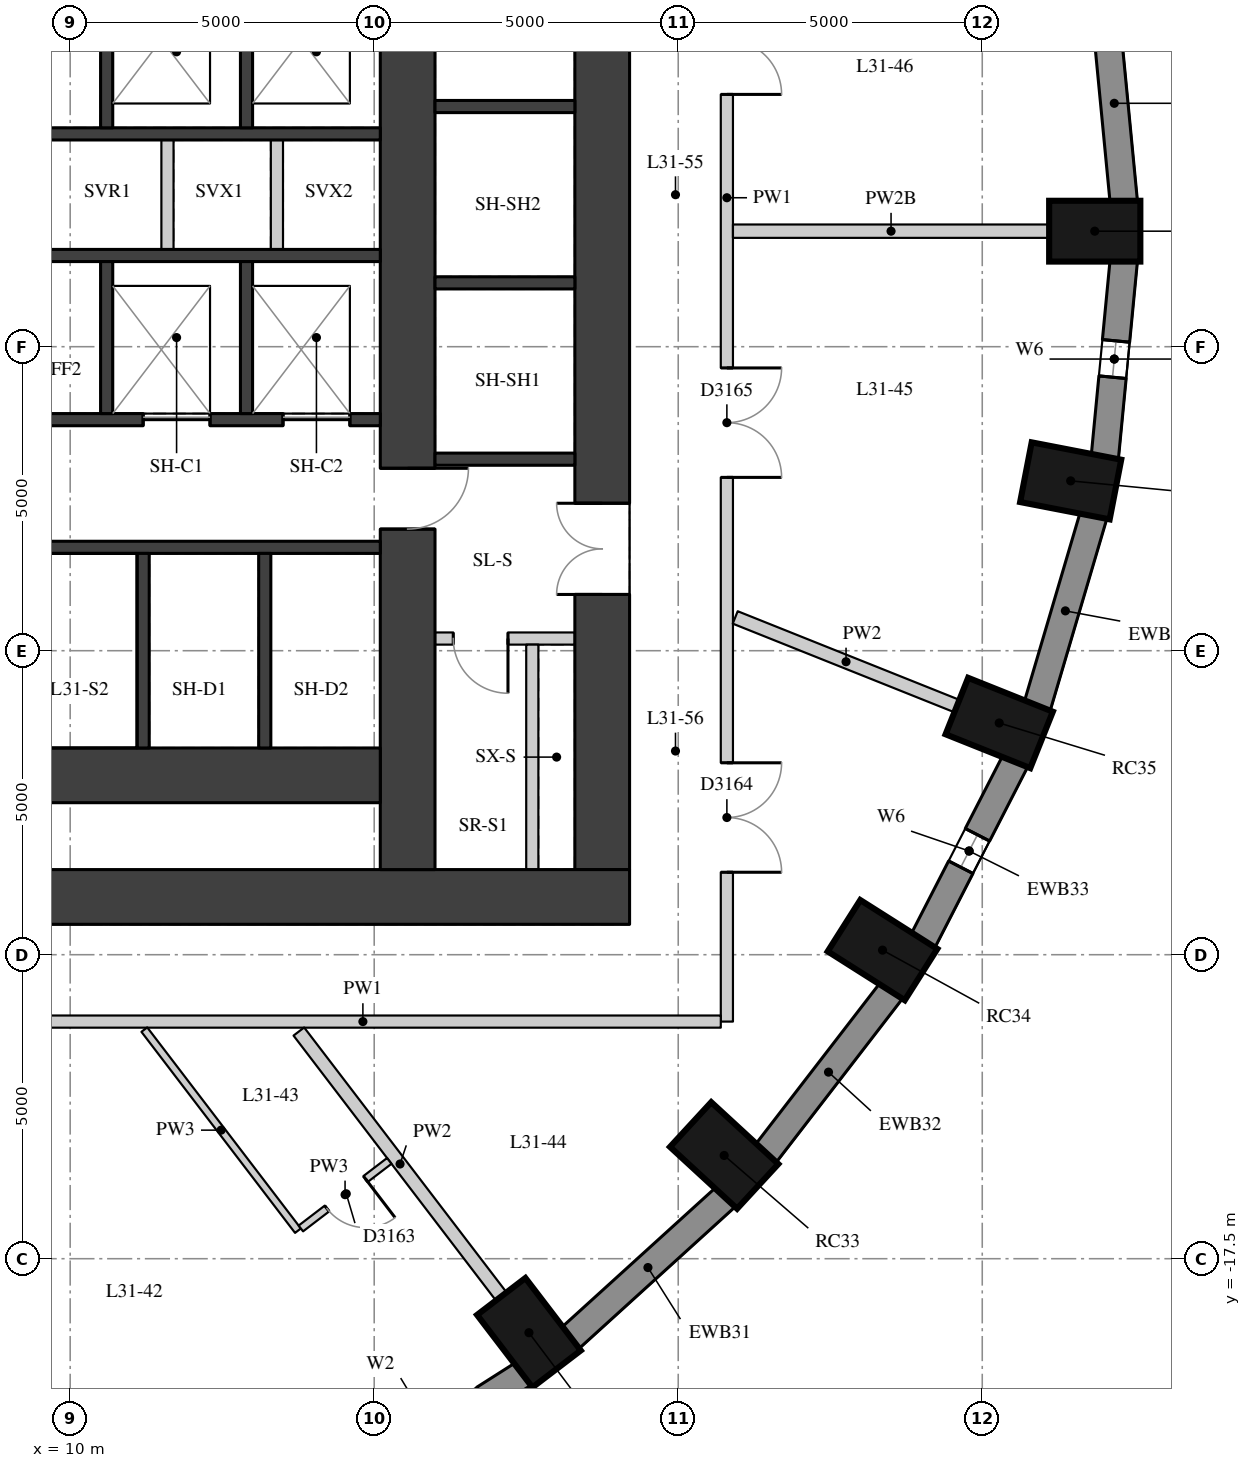
"""IFC4 building model, lengths in metres.
Left out: names, types, materials, properties, quantities, classifications, styles, units other than length and angle.
Written with IfcOpenShell. Run it as: python <this file> out.ifc"""

import sys

from ifc_helpers import new_model, si_unit, direction, frame, frame_2d, origin, origin_2d, place, context, subcontext, project, spatial, rectangle, extrude, element, fill, save


model = new_model("IFC4")
c1 = context("Model", 3, precision=1e-05, world=origin(), true_north=direction((0.0, 1.0)))
c2 = subcontext(c1, "Body", "Model", "MODEL_VIEW")
j1 = project(units=[si_unit("LENGTHUNIT", "METRE"), si_unit("PLANEANGLEUNIT", "RADIAN")], contexts=[c1])
p1 = place(None, origin())
s1 = spatial("IfcSite", under=j1, at=p1, CompositionType="ELEMENT")
p2 = place(p1, origin())
s2 = spatial("IfcBuilding", under=s1, at=p2, CompositionType="ELEMENT")
p3 = place(p2, frame((0.0, 0.0, 112.0)))
s3 = spatial("IfcBuildingStorey", under=s2, at=p3, CompositionType="ELEMENT", Elevation=112.0)
for number, where, z_axis, x_axis in (
    (1, (26.85, -0.6, 0.0), (0.0, 0.0, 1.0), (1.0, 0.0, 0.0)),
    (2, (17.545, -18.717, 0.0), (0.0, 0.0, 1.0), (0.607, -0.795, 0.0)),
    (3, (20.755, -15.802, 0.0), (0.0, 0.0, 1.0), (0.735, -0.678, 0.0)),
    (4, (23.36, -12.425, 0.0), (0.0, 0.0, 1.0), (0.845, -0.536, 0.0)),
    (5, (25.279, -8.689, 0.0), (0.0, 0.0, 1.0), (0.929, -0.371, 0.0)),
    (6, (26.454, -4.707, 0.0), (0.0, 0.0, 1.0), (0.982, -0.19, 0.0)),
):
    element("IfcColumn", number, at=place(p3, frame(where, z_axis=z_axis, x_axis=x_axis)), inside=s3, PredefinedType="COLUMN", context=c2, shape_type="SweptSolid", body=[
        extrude(rectangle(XDim=1.5, YDim=1.0, at=origin_2d()), origin(), (0.0, 0.0, 1.0), 3.3),
    ])
p4 = place(p3, frame((27.328, -0.12, 0.0), z_axis=(0.0, 0.0, 1.0), x_axis=(-0.09589355735, 0.995391594127, 0.0)))
e7 = element("IfcWall", 7, at=p4, inside=s3, PredefinedType="SOLIDWALL", context=c2, shape_type="SweptSolid", body=[
    extrude(rectangle(XDim=3.261, YDim=0.45, at=frame_2d((1.631, 0.0))), origin(), (0.0, 0.0, 1.0), 3.02),
])
p5 = place(p3, frame((14.475, -21.287, 0.0), z_axis=(0.0, 0.0, 1.0), x_axis=(0.843911841423, 0.536481876587, 0.0)))
e8 = element("IfcWall", 8, at=p5, inside=s3, PredefinedType="SOLIDWALL", context=c2, shape_type="SweptSolid", body=[
    extrude(rectangle(XDim=3.532, YDim=0.45, at=frame_2d((1.766, 0.0))), origin(), (0.0, 0.0, 1.0), 3.02),
])
p6 = place(p5, frame((0.766, 0.0, 0.4)))
e9 = element("IfcOpeningElement", 9, at=p6, cuts=e8, PredefinedType="OPENING", context=c2, shape_type="SweptSolid", body=[
    extrude(rectangle(XDim=2.0, YDim=1.75, at=frame_2d((1.0, 0.875))), frame((0.0, 0.235, 0.0), z_axis=(0.0, -1.0, 0.0), x_axis=(1.0, 0.0, 0.0)), (0.0, 0.0, 1.0), 0.47),
])
p7 = place(p3, frame((18.219, -18.81, 0.0), z_axis=(0.0, 0.0, 1.0), x_axis=(0.740364106106, 0.672206062446, 0.0)))
e10 = element("IfcWall", 10, at=p7, inside=s3, PredefinedType="SOLIDWALL", context=c2, shape_type="SweptSolid", body=[
    extrude(rectangle(XDim=3.464, YDim=0.45, at=frame_2d((1.732, 0.0))), origin(), (0.0, 0.0, 1.0), 3.02),
])
p8 = place(p3, frame((21.435, -15.775, 0.0), z_axis=(0.0, 0.0, 1.0), x_axis=(0.610693945156, 0.791866721961, 0.0)))
e11 = element("IfcWall", 11, at=p8, inside=s3, PredefinedType="SOLIDWALL", context=c2, shape_type="SweptSolid", body=[
    extrude(rectangle(XDim=3.395, YDim=0.45, at=frame_2d((1.697, 0.0))), origin(), (0.0, 0.0, 1.0), 3.02),
])
p9 = place(p3, frame((24.023, -12.277, 0.0), z_axis=(0.0, 0.0, 1.0), x_axis=(0.456828186229, 0.889554949549, 0.0)))
e12 = element("IfcWall", 12, at=p9, inside=s3, PredefinedType="SOLIDWALL", context=c2, shape_type="SweptSolid", body=[
    extrude(rectangle(XDim=3.333, YDim=0.45, at=frame_2d((1.667, 0.0))), origin(), (0.0, 0.0, 1.0), 3.02),
])
p10 = place(p9, frame((1.366, 0.0, 0.4)))
e13 = element("IfcOpeningElement", 13, at=p10, cuts=e12, PredefinedType="OPENING", context=c2, shape_type="SweptSolid", body=[
    extrude(rectangle(XDim=0.6, YDim=1.75, at=frame_2d((0.3, 0.875))), frame((0.0, 0.235, 0.0), z_axis=(0.0, -1.0, 0.0), x_axis=(1.0, 0.0, 0.0)), (0.0, 0.0, 1.0), 0.47),
])
p11 = place(p3, frame((25.902, -8.421, 0.0), z_axis=(0.0, 0.0, 1.0), x_axis=(0.282982737009, 0.95912500257, 0.0)))
e14 = element("IfcWall", 14, at=p11, inside=s3, PredefinedType="SOLIDWALL", context=c2, shape_type="SweptSolid", body=[
    extrude(rectangle(XDim=3.286, YDim=0.45, at=frame_2d((1.643, 0.0))), origin(), (0.0, 0.0, 1.0), 3.02),
])
p12 = place(p3, frame((27.015, -4.326, 0.0), z_axis=(0.0, 0.0, 1.0), x_axis=(0.09589355735, 0.995391594127, 0.0)))
e15 = element("IfcWall", 15, at=p12, inside=s3, PredefinedType="SOLIDWALL", context=c2, shape_type="SweptSolid", body=[
    extrude(rectangle(XDim=3.261, YDim=0.45, at=frame_2d((1.631, 0.0))), origin(), (0.0, 0.0, 1.0), 3.02),
])
p13 = place(p12, frame((1.331, 0.0, 0.4)))
e16 = element("IfcOpeningElement", 16, at=p13, cuts=e15, PredefinedType="OPENING", context=c2, shape_type="SweptSolid", body=[
    extrude(rectangle(XDim=0.6, YDim=1.75, at=frame_2d((0.3, 0.875))), frame((0.0, 0.235, 0.0), z_axis=(0.0, -1.0, 0.0), x_axis=(1.0, 0.0, 0.0)), (0.0, 0.0, 1.0), 0.47),
])
p14 = place(p3, frame((18.75, -11.1, 0.0), z_axis=(0.0, 0.0, 1.0), x_axis=(0.0, 1.0, 0.0)))
e17 = element("IfcWall", 17, at=p14, inside=s3, PredefinedType="SHEAR", context=c2, shape_type="SweptSolid", body=[
    extrude(rectangle(XDim=22.2, YDim=0.9, at=frame_2d((11.1, 0.0))), origin(), (0.0, 0.0, 1.0), 3.02),
])
p15 = place(p14, frame((15.925, 0.0, 0.0)))
e18 = element("IfcOpeningElement", 18, at=p15, cuts=e17, PredefinedType="OPENING", context=c2, shape_type="SweptSolid", body=[
    extrude(rectangle(XDim=1.5, YDim=2.1, at=frame_2d((0.75, 1.05))), frame((0.0, 0.46, 0.0), z_axis=(0.0, -1.0, 0.0), x_axis=(1.0, 0.0, 0.0)), (0.0, 0.0, 1.0), 0.92),
])
p16 = place(p14, frame((4.525, 0.0, 0.0)))
e19 = element("IfcOpeningElement", 19, at=p16, cuts=e17, PredefinedType="OPENING", context=c2, shape_type="SweptSolid", body=[
    extrude(rectangle(XDim=1.5, YDim=2.1, at=frame_2d((0.75, 1.05))), frame((0.0, 0.46, 0.0), z_axis=(0.0, -1.0, 0.0), x_axis=(1.0, 0.0, 0.0)), (0.0, 0.0, 1.0), 0.92),
])
p17 = place(p3, frame((4.0, -11.55, 0.0), z_axis=(0.0, 0.0, 1.0), x_axis=(1.0, 0.0, 0.0)))
e20 = element("IfcWall", 20, at=p17, inside=s3, PredefinedType="SHEAR", context=c2, shape_type="SweptSolid", body=[
    extrude(rectangle(XDim=15.2, YDim=0.9, at=frame_2d((7.6, 0.0))), origin(), (0.0, 0.0, 1.0), 3.02),
])
p18 = place(p3, frame((15.55, -11.1, 0.0), z_axis=(0.0, 0.0, 1.0), x_axis=(0.0, 1.0, 0.0)))
e21 = element("IfcWall", 21, at=p18, inside=s3, PredefinedType="SHEAR", context=c2, shape_type="SweptSolid", body=[
    extrude(rectangle(XDim=22.2, YDim=0.9, at=frame_2d((11.1, 0.0))), origin(), (0.0, 0.0, 1.0), 3.02),
])
p19 = place(p18, frame((15.6, 0.0, 0.0)))
e22 = element("IfcOpeningElement", 22, at=p19, cuts=e21, PredefinedType="OPENING", context=c2, shape_type="SweptSolid", body=[
    extrude(rectangle(XDim=1.0, YDim=2.1, at=frame_2d((0.5, 1.05))), frame((0.0, 0.46, 0.0), z_axis=(0.0, -1.0, 0.0), x_axis=(1.0, 0.0, 0.0)), (0.0, 0.0, 1.0), 0.92),
])
p20 = place(p18, frame((5.6, 0.0, 0.0)))
e23 = element("IfcOpeningElement", 23, at=p20, cuts=e21, PredefinedType="OPENING", context=c2, shape_type="SweptSolid", body=[
    extrude(rectangle(XDim=1.0, YDim=2.1, at=frame_2d((0.5, 1.05))), frame((0.0, 0.46, 0.0), z_axis=(0.0, -1.0, 0.0), x_axis=(1.0, 0.0, 0.0)), (0.0, 0.0, 1.0), 0.92),
])
p21 = place(p3, frame((4.9, -9.55, 0.0), z_axis=(0.0, 0.0, 1.0), x_axis=(1.0, 0.0, 0.0)))
e24 = element("IfcWall", 24, at=p21, inside=s3, PredefinedType="SHEAR", context=c2, shape_type="SweptSolid", body=[
    extrude(rectangle(XDim=10.2, YDim=0.9, at=frame_2d((5.1, 0.0))), origin(), (0.0, 0.0, 1.0), 3.02),
])
for number, where, z_axis, x_axis in (
    (25, (4.9, 1.0, 0.0), (0.0, 0.0, 1.0), (1.0, 0.0, 0.0)),
    (26, (4.9, -1.0, 0.0), (0.0, 0.0, 1.0), (1.0, 0.0, 0.0)),
):
    element("IfcWall", number, at=place(p3, frame(where, z_axis=z_axis, x_axis=x_axis)), inside=s3, PredefinedType="SHEAR", context=c2, shape_type="SweptSolid", body=[
        extrude(rectangle(XDim=10.2, YDim=0.2, at=frame_2d((5.1, 0.0))), origin(), (0.0, 0.0, 1.0), 3.02),
    ])
p22 = place(p3, frame((4.9, -3.7, 0.0), z_axis=(0.0, 0.0, 1.0), x_axis=(1.0, 0.0, 0.0)))
e27 = element("IfcWall", 27, at=p22, inside=s3, PredefinedType="SHEAR", context=c2, shape_type="SweptSolid", body=[
    extrude(rectangle(XDim=10.2, YDim=0.2, at=frame_2d((5.1, 0.0))), origin(), (0.0, 0.0, 1.0), 3.02),
])
p23 = place(p22, frame((6.3, 0.0, 0.0)))
e28 = element("IfcOpeningElement", 28, at=p23, cuts=e27, PredefinedType="OPENING", context=c2, shape_type="SweptSolid", body=[
    extrude(rectangle(XDim=1.1, YDim=2.1, at=frame_2d((0.55, 1.05))), frame((0.0, 0.11, 0.0), z_axis=(0.0, -1.0, 0.0), x_axis=(1.0, 0.0, 0.0)), (0.0, 0.0, 1.0), 0.22),
])
p24 = place(p22, frame((8.6, 0.0, 0.0)))
e29 = element("IfcOpeningElement", 29, at=p24, cuts=e27, PredefinedType="OPENING", context=c2, shape_type="SweptSolid", body=[
    extrude(rectangle(XDim=1.1, YDim=2.1, at=frame_2d((0.55, 1.05))), frame((0.0, 0.11, 0.0), z_axis=(0.0, -1.0, 0.0), x_axis=(1.0, 0.0, 0.0)), (0.0, 0.0, 1.0), 0.22),
])
p25 = place(p3, frame((4.9, -5.8, 0.0), z_axis=(0.0, 0.0, 1.0), x_axis=(1.0, 0.0, 0.0)))
e30 = element("IfcWall", 30, at=p25, inside=s3, PredefinedType="SHEAR", context=c2, shape_type="SweptSolid", body=[
    extrude(rectangle(XDim=10.2, YDim=0.2, at=frame_2d((5.1, 0.0))), origin(), (0.0, 0.0, 1.0), 3.02),
])
for number, where, z_axis, x_axis in (
    (31, (11.2, -9.1, 0.0), (0.0, 0.0, 1.0), (0.0, 1.0, 0.0)),
    (32, (13.2, -9.1, 0.0), (0.0, 0.0, 1.0), (0.0, 1.0, 0.0)),
):
    element("IfcWall", number, at=place(p3, frame(where, z_axis=z_axis, x_axis=x_axis)), inside=s3, PredefinedType="SHEAR", context=c2, shape_type="SweptSolid", body=[
        extrude(rectangle(XDim=3.2, YDim=0.2, at=frame_2d((1.6, 0.0))), origin(), (0.0, 0.0, 1.0), 3.02),
    ])
for number, where, z_axis, x_axis in (
    (33, (10.6, 1.1, 0.0), (0.0, 0.0, 1.0), (0.0, 1.0, 0.0)),
    (34, (10.6, -3.6, 0.0), (0.0, 0.0, 1.0), (0.0, 1.0, 0.0)),
    (35, (12.9, 1.1, 0.0), (0.0, 0.0, 1.0), (0.0, 1.0, 0.0)),
    (36, (12.9, -3.6, 0.0), (0.0, 0.0, 1.0), (0.0, 1.0, 0.0)),
):
    element("IfcWall", number, at=place(p3, frame(where, z_axis=z_axis, x_axis=x_axis)), inside=s3, PredefinedType="SHEAR", context=c2, shape_type="SweptSolid", body=[
        extrude(rectangle(XDim=2.5, YDim=0.2, at=frame_2d((1.25, 0.0))), origin(), (0.0, 0.0, 1.0), 3.02),
    ])
for number, where, z_axis, x_axis in (
    (37, (11.6, -0.9, 0.0), (0.0, 0.0, 1.0), (0.0, 1.0, 0.0)),
    (38, (13.4, -0.9, 0.0), (0.0, 0.0, 1.0), (0.0, 1.0, 0.0)),
):
    element("IfcWall", number, at=place(p3, frame(where, z_axis=z_axis, x_axis=x_axis)), inside=s3, PredefinedType="PARTITIONING", context=c2, shape_type="SweptSolid", body=[
        extrude(rectangle(XDim=1.8, YDim=0.2, at=frame_2d((0.9, 0.0))), origin(), (0.0, 0.0, 1.0), 3.02),
    ])
for number, where, z_axis, x_axis in (
    (39, (16.0, -4.35, 0.0), (0.0, 0.0, 1.0), (1.0, 0.0, 0.0)),
    (40, (16.0, -1.45, 0.0), (0.0, 0.0, 1.0), (1.0, 0.0, 0.0)),
    (41, (16.0, 1.45, 0.0), (0.0, 0.0, 1.0), (1.0, 0.0, 0.0)),
):
    element("IfcWall", number, at=place(p3, frame(where, z_axis=z_axis, x_axis=x_axis)), inside=s3, PredefinedType="SHEAR", context=c2, shape_type="SweptSolid", body=[
        extrude(rectangle(XDim=2.3, YDim=0.2, at=frame_2d((1.15, 0.0))), origin(), (0.0, 0.0, 1.0), 3.02),
    ])
p26 = place(p3, frame((16.0, -7.3, 0.0), z_axis=(0.0, 0.0, 1.0), x_axis=(1.0, 0.0, 0.0)))
e42 = element("IfcWall", 42, at=p26, inside=s3, PredefinedType="PARTITIONING", context=c2, shape_type="SweptSolid", body=[
    extrude(rectangle(XDim=2.3, YDim=0.2, at=frame_2d((1.15, 0.0))), origin(), (0.0, 0.0, 1.0), 3.02),
])
p27 = place(p26, frame((0.3, 0.0, 0.0)))
e43 = element("IfcOpeningElement", 43, at=p27, cuts=e42, PredefinedType="OPENING", context=c2, shape_type="SweptSolid", body=[
    extrude(rectangle(XDim=0.9, YDim=2.1, at=frame_2d((0.45, 1.05))), frame((0.0, 0.11, 0.0), z_axis=(0.0, -1.0, 0.0), x_axis=(1.0, 0.0, 0.0)), (0.0, 0.0, 1.0), 0.22),
])
p28 = place(p3, frame((17.6, -11.1, 0.0), z_axis=(0.0, 0.0, 1.0), x_axis=(0.0, 1.0, 0.0)))
e44 = element("IfcWall", 44, at=p28, inside=s3, PredefinedType="PARTITIONING", context=c2, shape_type="SweptSolid", body=[
    extrude(rectangle(XDim=3.7, YDim=0.2, at=frame_2d((1.85, 0.0))), origin(), (0.0, 0.0, 1.0), 3.02),
])
p29 = place(p3, frame((20.8, 13.5, 0.0), z_axis=(0.0, 0.0, 1.0), x_axis=(0.0, -1.0, 0.0)))
e45 = element("IfcWall", 45, at=p29, inside=s3, PredefinedType="PARTITIONING", context=c2, shape_type="SweptSolid", body=[
    extrude(rectangle(XDim=27.1, YDim=0.2, at=frame_2d((13.55, 0.0))), origin(), (0.0, 0.0, 1.0), 3.02),
])
p30 = place(p29, frame((22.844, 0.0, 0.0)))
e46 = element("IfcOpeningElement", 46, at=p30, cuts=e45, PredefinedType="OPENING", context=c2, shape_type="SweptSolid", body=[
    extrude(rectangle(XDim=1.8, YDim=2.1, at=frame_2d((0.9, 1.05))), frame((0.0, 0.11, 0.0), z_axis=(0.0, -1.0, 0.0), x_axis=(1.0, 0.0, 0.0)), (0.0, 0.0, 1.0), 0.22),
])
p31 = place(p29, frame((16.35, 0.0, 0.0)))
e47 = element("IfcOpeningElement", 47, at=p31, cuts=e45, PredefinedType="OPENING", context=c2, shape_type="SweptSolid", body=[
    extrude(rectangle(XDim=1.8, YDim=2.1, at=frame_2d((0.9, 1.05))), frame((0.0, 0.11, 0.0), z_axis=(0.0, -1.0, 0.0), x_axis=(1.0, 0.0, 0.0)), (0.0, 0.0, 1.0), 0.22),
])
p32 = place(p29, frame((10.051, 0.0, 0.0)))
e48 = element("IfcOpeningElement", 48, at=p32, cuts=e45, PredefinedType="OPENING", context=c2, shape_type="SweptSolid", body=[
    extrude(rectangle(XDim=1.8, YDim=2.1, at=frame_2d((0.9, 1.05))), frame((0.0, 0.11, 0.0), z_axis=(0.0, -1.0, 0.0), x_axis=(1.0, 0.0, 0.0)), (0.0, 0.0, 1.0), 0.22),
])
p33 = place(p3, frame((20.7, -13.6, 0.0), z_axis=(0.0, 0.0, 1.0), x_axis=(-1.0, 0.0, 0.0)))
e49 = element("IfcWall", 49, at=p33, inside=s3, PredefinedType="PARTITIONING", context=c2, shape_type="SweptSolid", body=[
    extrude(rectangle(XDim=11.772, YDim=0.2, at=frame_2d((5.886, 0.0))), origin(), (0.0, 0.0, 1.0), 3.02),
])
p34 = place(p3, frame((26.1, -0.6, 0.0), z_axis=(0.0, 0.0, 1.0), x_axis=(-1.0, 0.0, 0.0)))
e50 = element("IfcWall", 50, at=p34, inside=s3, PredefinedType="PARTITIONING", context=c2, shape_type="SweptSolid", body=[
    extrude(rectangle(XDim=5.2, YDim=0.22, at=frame_2d((2.6, 0.0))), origin(), (0.0, 0.0, 1.0), 2.57),
])
p35 = place(p3, frame((17.089, -18.121, 0.0), z_axis=(0.0, 0.0, 1.0), x_axis=(-0.607064955951, 0.794652212767, 0.0)))
e51 = element("IfcWall", 51, at=p35, inside=s3, PredefinedType="PARTITIONING", context=c2, shape_type="SweptSolid", body=[
    extrude(rectangle(XDim=5.483, YDim=0.22, at=frame_2d((2.742, 0.0))), origin(), (0.0, 0.0, 1.0), 3.02),
])
p36 = place(p3, frame((24.583, -8.41, 0.0), z_axis=(0.0, 0.0, 1.0), x_axis=(-0.928528147853, 0.371262008083, 0.0)))
e52 = element("IfcWall", 52, at=p36, inside=s3, PredefinedType="PARTITIONING", context=c2, shape_type="SweptSolid", body=[
    extrude(rectangle(XDim=3.926, YDim=0.22, at=frame_2d((1.963, 0.0))), origin(), (0.0, 0.0, 1.0), 3.02),
])
p37 = place(p3, frame((11.219, -13.732, 0.0), z_axis=(0.0, 0.0, 1.0), x_axis=(0.607090774052, -0.794632488677, 0.0)))
e53 = element("IfcWall", 53, at=p37, inside=s3, PredefinedType="PARTITIONING", context=c2, shape_type="SweptSolid", body=[
    extrude(rectangle(XDim=4.162, YDim=0.12, at=frame_2d((2.081, 0.0))), origin(), (0.0, 0.0, 1.0), 3.02),
])
p38 = place(p3, frame((13.794, -17.002, 0.0), z_axis=(0.0, 0.0, 1.0), x_axis=(0.794653128783, 0.607063756878, 0.0)))
e54 = element("IfcWall", 54, at=p38, inside=s3, PredefinedType="PARTITIONING", context=c2, shape_type="SweptSolid", body=[
    extrude(rectangle(XDim=1.83, YDim=0.12, at=frame_2d((0.915, 0.0))), origin(), (0.0, 0.0, 1.0), 3.02),
])
p39 = place(p38, frame((0.54, 0.0, 0.0)))
e55 = element("IfcOpeningElement", 55, at=p39, cuts=e54, PredefinedType="OPENING", context=c2, shape_type="SweptSolid", body=[
    extrude(rectangle(XDim=0.8, YDim=2.1, at=frame_2d((0.4, 1.05))), frame((0.0, 0.07, 0.0), z_axis=(0.0, -1.0, 0.0), x_axis=(1.0, 0.0, 0.0)), (0.0, 0.0, 1.0), 0.14),
])
p40 = place(p10, origin())
e56 = element("IfcWindow", 56, at=p40, inside=s3, PartitioningType="SINGLE_PANEL", PredefinedType="WINDOW", context=c2, shape_type="SweptSolid", body=[
    extrude(rectangle(XDim=0.6, YDim=1.75, at=frame_2d((0.3, 0.875))), frame((0.0, 0.035, 0.0), z_axis=(0.0, -1.0, 0.0), x_axis=(1.0, 0.0, 0.0)), (0.0, 0.0, 1.0), 0.06),
])
fill(e13, e56)
p41 = place(p13, origin())
e57 = element("IfcWindow", 57, at=p41, inside=s3, PartitioningType="SINGLE_PANEL", PredefinedType="WINDOW", context=c2, shape_type="SweptSolid", body=[
    extrude(rectangle(XDim=0.6, YDim=1.75, at=frame_2d((0.3, 0.875))), frame((0.0, 0.035, 0.0), z_axis=(0.0, -1.0, 0.0), x_axis=(1.0, 0.0, 0.0)), (0.0, 0.0, 1.0), 0.06),
])
fill(e16, e57)
p42 = place(p16, origin())
e58 = element("IfcDoor", 58, at=p42, inside=s3, OperationType="DOUBLE_DOOR_SINGLE_SWING", PredefinedType="DOOR", context=c2, shape_type="SweptSolid", body=[
    extrude(rectangle(XDim=1.5, YDim=2.1, at=frame_2d((0.75, 1.05))), frame((0.0, 0.025, 0.0), z_axis=(0.0, -1.0, 0.0), x_axis=(1.0, 0.0, 0.0)), (0.0, 0.0, 1.0), 0.05),
])
fill(e19, e58)
p43 = place(p23, origin())
e59 = element("IfcDoor", 59, at=p43, inside=s3, OperationType="DOUBLE_DOOR_SLIDING", PredefinedType="DOOR", context=c2, shape_type="SweptSolid", body=[
    extrude(rectangle(XDim=1.1, YDim=2.1, at=frame_2d((0.55, 1.05))), frame((0.0, 0.025, 0.0), z_axis=(0.0, -1.0, 0.0), x_axis=(1.0, 0.0, 0.0)), (0.0, 0.0, 1.0), 0.05),
])
fill(e28, e59)
p44 = place(p24, origin())
e60 = element("IfcDoor", 60, at=p44, inside=s3, OperationType="DOUBLE_DOOR_SLIDING", PredefinedType="DOOR", context=c2, shape_type="SweptSolid", body=[
    extrude(rectangle(XDim=1.1, YDim=2.1, at=frame_2d((0.55, 1.05))), frame((0.0, 0.025, 0.0), z_axis=(0.0, -1.0, 0.0), x_axis=(1.0, 0.0, 0.0)), (0.0, 0.0, 1.0), 0.05),
])
fill(e29, e60)
p45 = place(p20, origin())
e61 = element("IfcDoor", 61, at=p45, inside=s3, OperationType="SINGLE_SWING_LEFT", PredefinedType="DOOR", context=c2, shape_type="SweptSolid", body=[
    extrude(rectangle(XDim=1.0, YDim=2.1, at=frame_2d((0.5, 1.05))), frame((0.0, 0.025, 0.0), z_axis=(0.0, -1.0, 0.0), x_axis=(1.0, 0.0, 0.0)), (0.0, 0.0, 1.0), 0.05),
])
fill(e23, e61)
p46 = place(p27, origin())
e62 = element("IfcDoor", 62, at=p46, inside=s3, OperationType="SINGLE_SWING_LEFT", PredefinedType="DOOR", context=c2, shape_type="SweptSolid", body=[
    extrude(rectangle(XDim=0.9, YDim=2.1, at=frame_2d((0.45, 1.05))), frame((0.0, 0.025, 0.0), z_axis=(0.0, -1.0, 0.0), x_axis=(1.0, 0.0, 0.0)), (0.0, 0.0, 1.0), 0.05),
])
fill(e43, e62)
p47 = place(p39, origin())
e63 = element("IfcDoor", 63, at=p47, inside=s3, OperationType="SINGLE_SWING_LEFT", PredefinedType="DOOR", context=c2, shape_type="SweptSolid", body=[
    extrude(rectangle(XDim=0.8, YDim=2.1, at=frame_2d((0.4, 1.05))), frame((0.0, 0.025, 0.0), z_axis=(0.0, -1.0, 0.0), x_axis=(1.0, 0.0, 0.0)), (0.0, 0.0, 1.0), 0.05),
])
fill(e55, e63)
p48 = place(p30, origin())
e64 = element("IfcDoor", 64, at=p48, inside=s3, OperationType="DOUBLE_DOOR_SINGLE_SWING", PredefinedType="DOOR", context=c2, shape_type="SweptSolid", body=[
    extrude(rectangle(XDim=1.8, YDim=2.1, at=frame_2d((0.9, 1.05))), frame((0.0, 0.025, 0.0), z_axis=(0.0, -1.0, 0.0), x_axis=(1.0, 0.0, 0.0)), (0.0, 0.0, 1.0), 0.05),
])
fill(e46, e64)
p49 = place(p31, origin())
e65 = element("IfcDoor", 65, at=p49, inside=s3, OperationType="DOUBLE_DOOR_SINGLE_SWING", PredefinedType="DOOR", context=c2, shape_type="SweptSolid", body=[
    extrude(rectangle(XDim=1.8, YDim=2.1, at=frame_2d((0.9, 1.05))), frame((0.0, 0.025, 0.0), z_axis=(0.0, -1.0, 0.0), x_axis=(1.0, 0.0, 0.0)), (0.0, 0.0, 1.0), 0.05),
])
fill(e47, e65)
p50 = place(p32, origin())
e66 = element("IfcDoor", 66, at=p50, inside=s3, OperationType="DOUBLE_DOOR_SINGLE_SWING", PredefinedType="DOOR", context=c2, shape_type="SweptSolid", body=[
    extrude(rectangle(XDim=1.8, YDim=2.1, at=frame_2d((0.9, 1.05))), frame((0.0, 0.025, 0.0), z_axis=(0.0, -1.0, 0.0), x_axis=(1.0, 0.0, 0.0)), (0.0, 0.0, 1.0), 0.05),
])
fill(e48, e66)
save(model, sys.argv[1])
